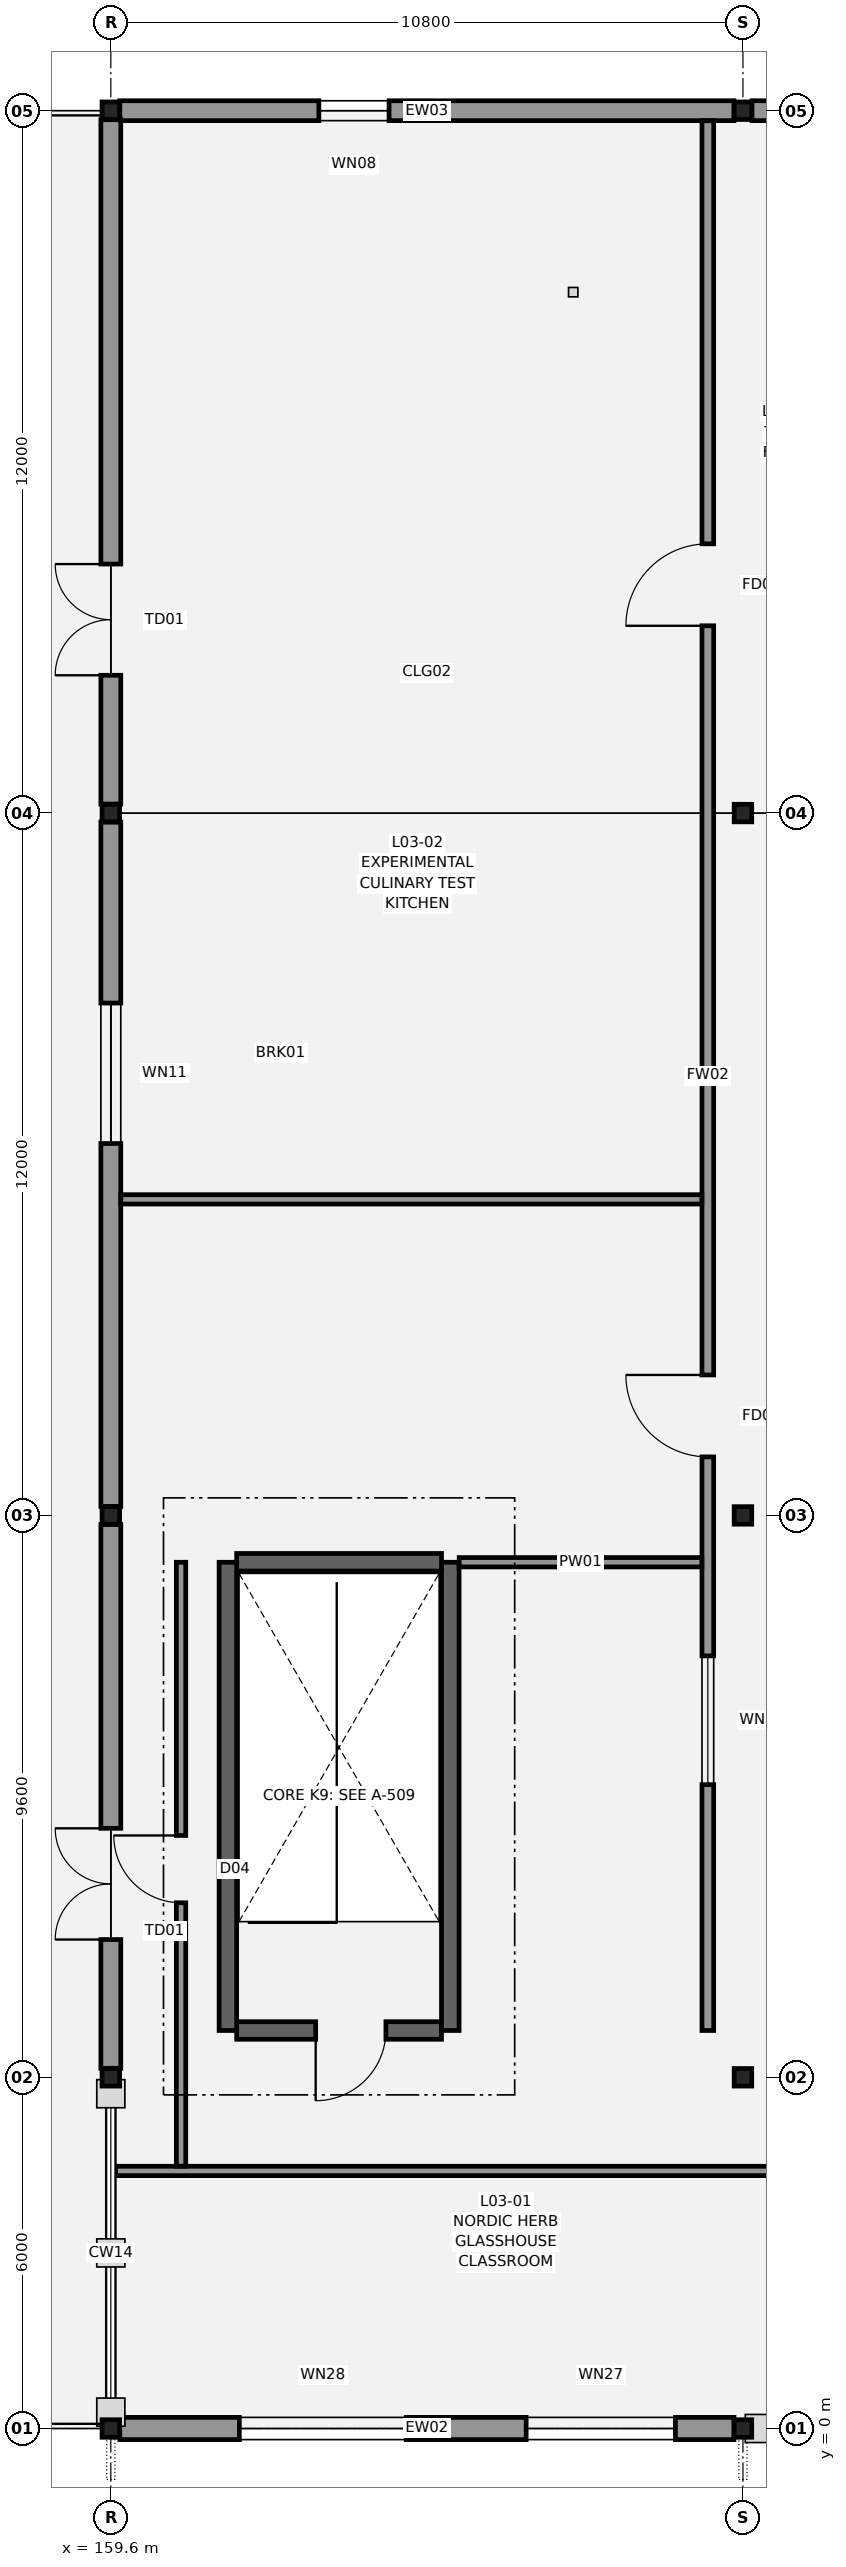
"""IFC4 building model, lengths in metres.
Left out: names, types, materials, properties, quantities, classifications, styles, units other than length and angle.
Written with IfcOpenShell. Run it as: python <this file> out.ifc"""

import sys

from ifc_helpers import new_model, si_unit, direction, frame, frame_2d, origin, origin_2d, place, context, subcontext, project, spatial, rectangle, i_section, extrude, element, fill, save


model = new_model("IFC4")
c1 = context("Model", 3, precision=1e-05, world=origin(), true_north=direction((0.0, 1.0)))
c2 = subcontext(c1, "Body", "Model", "MODEL_VIEW")
j1 = project(units=[si_unit("LENGTHUNIT", "METRE"), si_unit("PLANEANGLEUNIT", "RADIAN")], contexts=[c1])
p1 = place(None, origin())
s1 = spatial("IfcSite", under=j1, at=p1, CompositionType="ELEMENT")
p2 = place(p1, origin())
s2 = spatial("IfcBuilding", under=s1, at=p2, CompositionType="ELEMENT")
p3 = place(p2, frame((0.0, 0.0, 14.4)))
s3 = spatial("IfcBuildingStorey", under=s2, at=p3, CompositionType="ELEMENT", Elevation=14.4)
for number, where, z_axis, x_axis in (
    (1, (159.6, 0.0, 0.0), (0.0, 0.0, 1.0), (1.0, 0.0, 0.0)),
    (2, (159.6, 6.0, 0.0), (0.0, 0.0, 1.0), (1.0, 0.0, 0.0)),
    (3, (159.6, 15.6, 0.0), (0.0, 0.0, 1.0), (1.0, 0.0, 0.0)),
    (4, (159.6, 27.6, 0.0), (0.0, 0.0, 1.0), (1.0, 0.0, 0.0)),
    (5, (159.6, 39.6, 0.0), (0.0, 0.0, 1.0), (1.0, 0.0, 0.0)),
    (6, (170.4, 0.0, 0.0), (0.0, 0.0, 1.0), (1.0, 0.0, 0.0)),
    (7, (170.4, 6.0, 0.0), (0.0, 0.0, 1.0), (1.0, 0.0, 0.0)),
    (8, (170.4, 15.6, 0.0), (0.0, 0.0, 1.0), (1.0, 0.0, 0.0)),
    (9, (170.4, 27.6, 0.0), (0.0, 0.0, 1.0), (1.0, 0.0, 0.0)),
    (10, (170.4, 39.6, 0.0), (0.0, 0.0, 1.0), (1.0, 0.0, 0.0)),
):
    element("IfcColumn", number, at=place(p3, frame(where, z_axis=z_axis, x_axis=x_axis)), inside=s3, PredefinedType="COLUMN", context=c2, shape_type="SweptSolid", body=[
        extrude(i_section(OverallWidth=0.3, OverallDepth=0.3, WebThickness=0.011, FlangeThickness=0.019, FilletRadius=0.027, at=origin_2d()), origin(), (0.0, 0.0, 1.0), 4.2),
    ])
p4 = place(p3, frame((165.25, 6.8, 0.0), z_axis=(0.0, 0.0, 1.0), x_axis=(-1.0, 0.0, 0.0)))
e11 = element("IfcWall", 11, at=p4, inside=s3, PredefinedType="SHEAR", context=c2, shape_type="SweptSolid", body=[
    extrude(rectangle(XDim=3.5, YDim=0.3, at=frame_2d((1.75, 0.0))), origin(), (0.0, 0.0, 1.0), 3.9),
])
p5 = place(p4, frame((0.95, 0.0, 0.0)))
e12 = element("IfcOpeningElement", 12, at=p5, cuts=e11, PredefinedType="OPENING", context=c2, shape_type="SweptSolid", body=[
    extrude(rectangle(XDim=1.2, YDim=2.2, at=frame_2d((0.6, 1.1))), frame((0.0, 0.16, 0.0), z_axis=(0.0, -1.0, 0.0), x_axis=(1.0, 0.0, 0.0)), (0.0, 0.0, 1.0), 0.32),
])
p6 = place(p3, frame((165.4, 6.8, 0.0), z_axis=(0.0, 0.0, 1.0), x_axis=(0.0, 1.0, 0.0)))
e13 = element("IfcWall", 13, at=p6, inside=s3, PredefinedType="SHEAR", context=c2, shape_type="SweptSolid", body=[
    extrude(rectangle(XDim=8.0, YDim=0.3, at=frame_2d((4.0, 0.0))), origin(), (0.0, 0.0, 1.0), 3.9),
])
p7 = place(p3, frame((165.25, 14.8, 0.0), z_axis=(0.0, 0.0, 1.0), x_axis=(-1.0, 0.0, 0.0)))
e14 = element("IfcWall", 14, at=p7, inside=s3, PredefinedType="SHEAR", context=c2, shape_type="SweptSolid", body=[
    extrude(rectangle(XDim=3.5, YDim=0.3, at=frame_2d((1.75, 0.0))), origin(), (0.0, 0.0, 1.0), 3.9),
])
p8 = place(p3, frame((161.6, 14.8, 0.0), z_axis=(0.0, 0.0, 1.0), x_axis=(0.0, -1.0, 0.0)))
e15 = element("IfcWall", 15, at=p8, inside=s3, PredefinedType="SHEAR", context=c2, shape_type="SweptSolid", body=[
    extrude(rectangle(XDim=8.0, YDim=0.3, at=frame_2d((4.0, 0.0))), origin(), (0.0, 0.0, 1.0), 3.9),
])
p9 = place(p3, frame((170.246, 0.0, 0.0), z_axis=(0.0, 0.0, 1.0), x_axis=(-1.0, 0.0, 0.0)))
e16 = element("IfcWall", 16, at=p9, inside=s3, PredefinedType="STANDARD", context=c2, shape_type="SweptSolid", body=[
    extrude(rectangle(XDim=10.492, YDim=0.38, at=frame_2d((5.246, 0.0))), origin(), (0.0, 0.0, 1.0), 3.535),
])
p10 = place(p9, frame((1.0, 0.0, 0.8)))
e17 = element("IfcOpeningElement", 17, at=p10, cuts=e16, PredefinedType="OPENING", context=c2, shape_type="SweptSolid", body=[
    extrude(rectangle(XDim=2.55, YDim=1.65, at=frame_2d((1.275, 0.825))), frame((0.0, 0.2, 0.0), z_axis=(0.0, -1.0, 0.0), x_axis=(1.0, 0.0, 0.0)), (0.0, 0.0, 1.0), 0.4),
])
p11 = place(p9, frame((5.6, 0.0, 0.8)))
e18 = element("IfcOpeningElement", 18, at=p11, cuts=e16, PredefinedType="OPENING", context=c2, shape_type="SweptSolid", body=[
    extrude(rectangle(XDim=2.85, YDim=1.65, at=frame_2d((1.425, 0.825))), frame((0.0, 0.2, 0.0), z_axis=(0.0, -1.0, 0.0), x_axis=(1.0, 0.0, 0.0)), (0.0, 0.0, 1.0), 0.4),
])
p12 = place(p3, frame((159.754, 39.6, 0.0), z_axis=(0.0, 0.0, 1.0), x_axis=(1.0, 0.0, 0.0)))
e19 = element("IfcWall", 19, at=p12, inside=s3, PredefinedType="STANDARD", context=c2, shape_type="SweptSolid", body=[
    extrude(rectangle(XDim=10.492, YDim=0.34, at=frame_2d((5.246, 0.0))), origin(), (0.0, 0.0, 1.0), 3.625),
])
p13 = place(p12, frame((3.4, 0.0, 0.8)))
e20 = element("IfcOpeningElement", 20, at=p13, cuts=e19, PredefinedType="OPENING", context=c2, shape_type="SweptSolid", body=[
    extrude(rectangle(XDim=1.2, YDim=2.0, at=frame_2d((0.6, 1.0))), frame((0.0, 0.18, 0.0), z_axis=(0.0, -1.0, 0.0), x_axis=(1.0, 0.0, 0.0)), (0.0, 0.0, 1.0), 0.36),
])
p14 = place(p3, frame((170.554, 39.6, 0.0), z_axis=(0.0, 0.0, 1.0), x_axis=(1.0, 0.0, 0.0)))
e21 = element("IfcWall", 21, at=p14, inside=s3, PredefinedType="STANDARD", context=c2, shape_type="SweptSolid", body=[
    extrude(rectangle(XDim=10.492, YDim=0.34, at=frame_2d((5.246, 0.0))), origin(), (0.0, 0.0, 1.0), 3.625),
])
p15 = place(p14, frame((2.0, 0.0, 0.8)))
e22 = element("IfcOpeningElement", 22, at=p15, cuts=e21, PredefinedType="OPENING", context=c2, shape_type="SweptSolid", body=[
    extrude(rectangle(XDim=1.6, YDim=2.0, at=frame_2d((0.8, 1.0))), frame((0.0, 0.18, 0.0), z_axis=(0.0, -1.0, 0.0), x_axis=(1.0, 0.0, 0.0)), (0.0, 0.0, 1.0), 0.36),
])
p16 = place(p3, frame((159.6, 6.154, 0.0), z_axis=(0.0, 0.0, 1.0), x_axis=(0.0, 1.0, 0.0)))
e23 = element("IfcWall", 23, at=p16, inside=s3, PredefinedType="STANDARD", context=c2, shape_type="SweptSolid", body=[
    extrude(rectangle(XDim=9.292, YDim=0.34, at=frame_2d((4.646, 0.0))), origin(), (0.0, 0.0, 1.0), 3.685),
])
p17 = place(p16, frame((2.2, 0.0, 0.0)))
e24 = element("IfcOpeningElement", 24, at=p17, cuts=e23, PredefinedType="OPENING", context=c2, shape_type="SweptSolid", body=[
    extrude(rectangle(XDim=1.9, YDim=2.3, at=frame_2d((0.95, 1.15))), frame((0.0, 0.18, 0.0), z_axis=(0.0, -1.0, 0.0), x_axis=(1.0, 0.0, 0.0)), (0.0, 0.0, 1.0), 0.36),
])
p18 = place(p3, frame((159.6, 15.754, 0.0), z_axis=(0.0, 0.0, 1.0), x_axis=(0.0, 1.0, 0.0)))
e25 = element("IfcWall", 25, at=p18, inside=s3, PredefinedType="STANDARD", context=c2, shape_type="SweptSolid", body=[
    extrude(rectangle(XDim=11.692, YDim=0.34, at=frame_2d((5.846, 0.0))), origin(), (0.0, 0.0, 1.0), 3.685),
])
p19 = place(p18, frame((6.2, 0.0, 0.8)))
e26 = element("IfcOpeningElement", 26, at=p19, cuts=e25, PredefinedType="OPENING", context=c2, shape_type="SweptSolid", body=[
    extrude(rectangle(XDim=2.4, YDim=2.1, at=frame_2d((1.2, 1.05))), frame((0.0, 0.18, 0.0), z_axis=(0.0, -1.0, 0.0), x_axis=(1.0, 0.0, 0.0)), (0.0, 0.0, 1.0), 0.36),
])
p20 = place(p3, frame((159.6, 27.754, 0.0), z_axis=(0.0, 0.0, 1.0), x_axis=(0.0, 1.0, 0.0)))
e27 = element("IfcWall", 27, at=p20, inside=s3, PredefinedType="STANDARD", context=c2, shape_type="SweptSolid", body=[
    extrude(rectangle(XDim=11.692, YDim=0.34, at=frame_2d((5.846, 0.0))), origin(), (0.0, 0.0, 1.0), 3.625),
])
p21 = place(p20, frame((2.2, 0.0, 0.0)))
e28 = element("IfcOpeningElement", 28, at=p21, cuts=e27, PredefinedType="OPENING", context=c2, shape_type="SweptSolid", body=[
    extrude(rectangle(XDim=1.9, YDim=2.3, at=frame_2d((0.95, 1.15))), frame((0.0, 0.18, 0.0), z_axis=(0.0, -1.0, 0.0), x_axis=(1.0, 0.0, 0.0)), (0.0, 0.0, 1.0), 0.36),
])
p22 = place(p3, frame((159.682, 4.4, 0.0), z_axis=(0.0, 0.0, 1.0), x_axis=(1.0, 0.0, 0.0)))
e29 = element("IfcWall", 29, at=p22, inside=s3, PredefinedType="PARTITIONING", context=c2, shape_type="SweptSolid", body=[
    extrude(rectangle(XDim=32.126, YDim=0.16, at=frame_2d((16.063, 0.0))), origin(), (0.0, 0.0, 1.0), 3.84),
])
p23 = place(p22, frame((16.0, 0.0, 0.0)))
e30 = element("IfcOpeningElement", 30, at=p23, cuts=e29, PredefinedType="OPENING", context=c2, shape_type="SweptSolid", body=[
    extrude(rectangle(XDim=1.15, YDim=2.15, at=frame_2d((0.575, 1.075))), frame((0.0, 0.09, 0.0), z_axis=(0.0, -1.0, 0.0), x_axis=(1.0, 0.0, 0.0)), (0.0, 0.0, 1.0), 0.18),
])
p24 = place(p3, frame((169.8, 6.8, 0.0), z_axis=(0.0, 0.0, 1.0), x_axis=(0.0, 1.0, 0.0)))
e31 = element("IfcWall", 31, at=p24, inside=s3, PredefinedType="PARTITIONING", context=c2, shape_type="SweptSolid", body=[
    extrude(rectangle(XDim=32.628, YDim=0.2, at=frame_2d((16.314, 0.0))), origin(), (0.0, 0.0, 1.0), 3.84),
])
p25 = place(p24, frame((9.8, 0.0, 0.0)))
e32 = element("IfcOpeningElement", 32, at=p25, cuts=e31, PredefinedType="OPENING", context=c2, shape_type="SweptSolid", body=[
    extrude(rectangle(XDim=1.4, YDim=2.2, at=frame_2d((0.7, 1.1))), frame((0.0, 0.11, 0.0), z_axis=(0.0, -1.0, 0.0), x_axis=(1.0, 0.0, 0.0)), (0.0, 0.0, 1.0), 0.22),
])
p26 = place(p24, frame((24.0, 0.0, 0.0)))
e33 = element("IfcOpeningElement", 33, at=p26, cuts=e31, PredefinedType="OPENING", context=c2, shape_type="SweptSolid", body=[
    extrude(rectangle(XDim=1.4, YDim=2.2, at=frame_2d((0.7, 1.1))), frame((0.0, 0.11, 0.0), z_axis=(0.0, -1.0, 0.0), x_axis=(1.0, 0.0, 0.0)), (0.0, 0.0, 1.0), 0.22),
])
p27 = place(p24, frame((4.2, 0.0, 1.05)))
e34 = element("IfcOpeningElement", 34, at=p27, cuts=e31, PredefinedType="OPENING", context=c2, shape_type="SweptSolid", body=[
    extrude(rectangle(XDim=2.2, YDim=1.3, at=frame_2d((1.1, 0.65))), frame((0.0, 0.11, 0.0), z_axis=(0.0, -1.0, 0.0), x_axis=(1.0, 0.0, 0.0)), (0.0, 0.0, 1.0), 0.22),
])
p28 = place(p3, frame((160.8, 4.482, 0.0), z_axis=(0.0, 0.0, 1.0), x_axis=(0.0, 1.0, 0.0)))
e35 = element("IfcWall", 35, at=p28, inside=s3, PredefinedType="PARTITIONING", context=c2, shape_type="SweptSolid", body=[
    extrude(rectangle(XDim=10.318, YDim=0.16, at=frame_2d((5.159, 0.0))), origin(), (0.0, 0.0, 1.0), 3.84),
])
p29 = place(p28, frame((4.5, 0.0, 0.0)))
e36 = element("IfcOpeningElement", 36, at=p29, cuts=e35, PredefinedType="OPENING", context=c2, shape_type="SweptSolid", body=[
    extrude(rectangle(XDim=1.15, YDim=2.15, at=frame_2d((0.575, 1.075))), frame((0.0, 0.09, 0.0), z_axis=(0.0, -1.0, 0.0), x_axis=(1.0, 0.0, 0.0)), (0.0, 0.0, 1.0), 0.18),
])
p30 = place(p3, frame((165.552, 14.8, 0.0), z_axis=(0.0, 0.0, 1.0), x_axis=(1.0, 0.0, 0.0)))
e37 = element("IfcWall", 37, at=p30, inside=s3, PredefinedType="PARTITIONING", context=c2, shape_type="SweptSolid", body=[
    extrude(rectangle(XDim=4.146, YDim=0.16, at=frame_2d((2.073, 0.0))), origin(), (0.0, 0.0, 1.0), 3.84),
])
p31 = place(p3, frame((159.772, 21.0, 0.0), z_axis=(0.0, 0.0, 1.0), x_axis=(1.0, 0.0, 0.0)))
e38 = element("IfcWall", 38, at=p31, inside=s3, PredefinedType="PARTITIONING", context=c2, shape_type="SweptSolid", body=[
    extrude(rectangle(XDim=9.926, YDim=0.16, at=frame_2d((4.963, 0.0))), origin(), (0.0, 0.0, 1.0), 3.84),
])
p32 = place(p10, origin())
e39 = element("IfcWindow", 39, at=p32, inside=s3, PartitioningType="SINGLE_PANEL", PredefinedType="WINDOW", context=c2, shape_type="SweptSolid", body=[
    extrude(rectangle(XDim=2.55, YDim=1.65, at=frame_2d((1.275, 0.825))), frame((0.0, 0.03, 0.0), z_axis=(0.0, -1.0, 0.0), x_axis=(1.0, 0.0, 0.0)), (0.0, 0.0, 1.0), 0.06),
])
fill(e17, e39)
p33 = place(p11, origin())
e40 = element("IfcWindow", 40, at=p33, inside=s3, PartitioningType="SINGLE_PANEL", PredefinedType="WINDOW", context=c2, shape_type="SweptSolid", body=[
    extrude(rectangle(XDim=2.85, YDim=1.65, at=frame_2d((1.425, 0.825))), frame((0.0, 0.03, 0.0), z_axis=(0.0, -1.0, 0.0), x_axis=(1.0, 0.0, 0.0)), (0.0, 0.0, 1.0), 0.06),
])
fill(e18, e40)
p34 = place(p13, origin())
e41 = element("IfcWindow", 41, at=p34, inside=s3, PartitioningType="SINGLE_PANEL", PredefinedType="WINDOW", context=c2, shape_type="SweptSolid", body=[
    extrude(rectangle(XDim=1.2, YDim=2.0, at=frame_2d((0.6, 1.0))), frame((0.0, 0.03, 0.0), z_axis=(0.0, -1.0, 0.0), x_axis=(1.0, 0.0, 0.0)), (0.0, 0.0, 1.0), 0.06),
])
fill(e20, e41)
p35 = place(p17, origin())
e42 = element("IfcDoor", 42, at=p35, inside=s3, OperationType="DOUBLE_DOOR_SINGLE_SWING", PredefinedType="DOOR", context=c2, shape_type="SweptSolid", body=[
    extrude(rectangle(XDim=1.9, YDim=2.3, at=frame_2d((0.95, 1.15))), frame((0.0, 0.025, 0.0), z_axis=(0.0, -1.0, 0.0), x_axis=(1.0, 0.0, 0.0)), (0.0, 0.0, 1.0), 0.05),
])
fill(e24, e42)
p36 = place(p19, origin())
e43 = element("IfcWindow", 43, at=p36, inside=s3, PartitioningType="SINGLE_PANEL", PredefinedType="WINDOW", context=c2, shape_type="SweptSolid", body=[
    extrude(rectangle(XDim=2.4, YDim=2.1, at=frame_2d((1.2, 1.05))), frame((0.0, 0.03, 0.0), z_axis=(0.0, -1.0, 0.0), x_axis=(1.0, 0.0, 0.0)), (0.0, 0.0, 1.0), 0.06),
])
fill(e26, e43)
p37 = place(p21, origin())
e44 = element("IfcDoor", 44, at=p37, inside=s3, OperationType="DOUBLE_DOOR_SINGLE_SWING", PredefinedType="DOOR", context=c2, shape_type="SweptSolid", body=[
    extrude(rectangle(XDim=1.9, YDim=2.3, at=frame_2d((0.95, 1.15))), frame((0.0, 0.025, 0.0), z_axis=(0.0, -1.0, 0.0), x_axis=(1.0, 0.0, 0.0)), (0.0, 0.0, 1.0), 0.05),
])
fill(e28, e44)
p38 = place(p25, origin())
e45 = element("IfcDoor", 45, at=p38, inside=s3, OperationType="SINGLE_SWING_RIGHT", PredefinedType="DOOR", context=c2, shape_type="SweptSolid", body=[
    extrude(rectangle(XDim=1.4, YDim=2.2, at=frame_2d((0.7, 1.1))), frame((0.0, 0.025, 0.0), z_axis=(0.0, -1.0, 0.0), x_axis=(1.0, 0.0, 0.0)), (0.0, 0.0, 1.0), 0.05),
])
fill(e32, e45)
p39 = place(p26, origin())
e46 = element("IfcDoor", 46, at=p39, inside=s3, OperationType="SINGLE_SWING_LEFT", PredefinedType="DOOR", context=c2, shape_type="SweptSolid", body=[
    extrude(rectangle(XDim=1.4, YDim=2.2, at=frame_2d((0.7, 1.1))), frame((0.0, 0.025, 0.0), z_axis=(0.0, -1.0, 0.0), x_axis=(1.0, 0.0, 0.0)), (0.0, 0.0, 1.0), 0.05),
])
fill(e33, e46)
p40 = place(p29, origin())
e47 = element("IfcDoor", 47, at=p40, inside=s3, OperationType="SINGLE_SWING_RIGHT", PredefinedType="DOOR", context=c2, shape_type="SweptSolid", body=[
    extrude(rectangle(XDim=1.15, YDim=2.15, at=frame_2d((0.575, 1.075))), frame((0.0, 0.025, 0.0), z_axis=(0.0, -1.0, 0.0), x_axis=(1.0, 0.0, 0.0)), (0.0, 0.0, 1.0), 0.05),
])
fill(e36, e47)
p41 = place(p27, origin())
e48 = element("IfcWindow", 48, at=p41, inside=s3, PartitioningType="SINGLE_PANEL", PredefinedType="WINDOW", context=c2, shape_type="SweptSolid", body=[
    extrude(rectangle(XDim=2.2, YDim=1.3, at=frame_2d((1.1, 0.65))), frame((0.0, 0.03, 0.0), z_axis=(0.0, -1.0, 0.0), x_axis=(1.0, 0.0, 0.0)), (0.0, 0.0, 1.0), 0.06),
])
fill(e34, e48)
p42 = place(p5, origin())
e49 = element("IfcDoor", 49, at=p42, inside=s3, OperationType="SINGLE_SWING_RIGHT", PredefinedType="DOOR", context=c2, shape_type="SweptSolid", body=[
    extrude(rectangle(XDim=1.2, YDim=2.2, at=frame_2d((0.6, 1.1))), frame((0.0, 0.025, 0.0), z_axis=(0.0, -1.0, 0.0), x_axis=(1.0, 0.0, 0.0)), (0.0, 0.0, 1.0), 0.05),
])
fill(e12, e49)
save(model, sys.argv[1])
